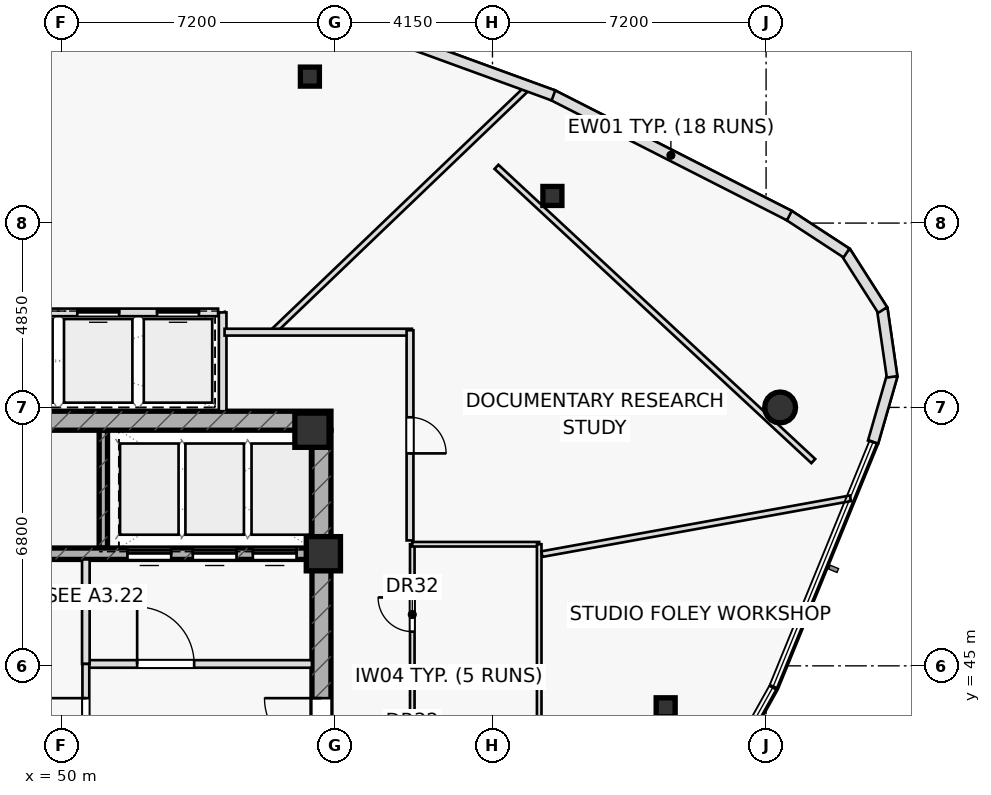
"""IFC4 building model, lengths in metres.
Left out: names, types, materials, properties, quantities, classifications, styles, units other than length and angle.
Written with IfcOpenShell. Run it as: python <this file> out.ifc"""

import sys

from ifc_helpers import new_model, si_unit, direction, frame, frame_2d, origin, origin_2d, place, context, subcontext, project, spatial, rectangle, hollow_rectangle, hollow_circle, extrude, element, fill, save


model = new_model("IFC4")
c1 = context("Model", 3, precision=1e-05, world=origin(), true_north=direction((0.0, 1.0)))
c2 = subcontext(c1, "Body", "Model", "MODEL_VIEW")
j1 = project(units=[si_unit("LENGTHUNIT", "METRE"), si_unit("PLANEANGLEUNIT", "RADIAN")], contexts=[c1])
p1 = place(None, origin())
s1 = spatial("IfcSite", under=j1, at=p1, CompositionType="ELEMENT")
p2 = place(p1, origin())
s2 = spatial("IfcBuilding", under=s1, at=p2, CompositionType="ELEMENT")
p3 = place(p2, frame((0.0, 0.0, 253.75)))
s3 = spatial("IfcBuildingStorey", under=s2, at=p3, CompositionType="ELEMENT", Elevation=253.75)
p4 = place(p3, frame((51.11, 48.1, 0.0), z_axis=(0.0, 0.0, 1.0), x_axis=(0.0, 1.0, 0.0)))
e1 = element("IfcWall", 1, at=p4, inside=s3, PredefinedType="SHEAR", context=c2, shape_type="SweptSolid", body=[
    extrude(rectangle(XDim=3.1, YDim=0.22, at=frame_2d((1.55, 0.0))), origin(), (0.0, 0.0, 1.0), 3.65),
])
p5 = place(p3, frame((42.9, 51.45, 0.0), z_axis=(0.0, 0.0, 1.0), x_axis=(1.0, 0.0, 0.0)))
e2 = element("IfcWall", 2, at=p5, inside=s3, PredefinedType="SHEAR", context=c2, shape_type="SweptSolid", body=[
    extrude(rectangle(XDim=14.2, YDim=0.5, at=frame_2d((7.1, 0.0))), origin(), (0.0, 0.0, 1.0), 3.65),
])
p6 = place(p5, frame((0.78, 0.0, 0.0)))
e3 = element("IfcOpeningElement", 3, at=p6, cuts=e2, PredefinedType="OPENING", context=c2, shape_type="SweptSolid", body=[
    extrude(rectangle(XDim=1.05, YDim=2.2, at=frame_2d((0.525, 1.1))), frame((0.0, 0.26, 0.0), z_axis=(0.0, -1.0, 0.0), x_axis=(1.0, 0.0, 0.0)), (0.0, 0.0, 1.0), 0.52),
])
p7 = place(p3, frame((56.85, 38.8, 0.0), z_axis=(0.0, 0.0, 1.0), x_axis=(0.0, 1.0, 0.0)))
e4 = element("IfcWall", 4, at=p7, inside=s3, PredefinedType="SHEAR", context=c2, shape_type="SweptSolid", body=[
    extrude(rectangle(XDim=12.4, YDim=0.5, at=frame_2d((6.2, 0.0))), origin(), (0.0, 0.0, 1.0), 3.65),
])
p8 = place(p7, frame((3.85, 0.0, 0.0)))
e5 = element("IfcOpeningElement", 5, at=p8, cuts=e4, PredefinedType="OPENING", context=c2, shape_type="SweptSolid", body=[
    extrude(rectangle(XDim=1.5, YDim=2.2, at=frame_2d((0.75, 1.1))), frame((0.0, 0.26, 0.0), z_axis=(0.0, -1.0, 0.0), x_axis=(1.0, 0.0, 0.0)), (0.0, 0.0, 1.0), 0.52),
])
p9 = place(p3, frame((43.4, 47.95, 0.0), z_axis=(0.0, 0.0, 1.0), x_axis=(1.0, 0.0, 0.0)))
e6 = element("IfcWall", 6, at=p9, inside=s3, PredefinedType="SHEAR", context=c2, shape_type="SweptSolid", body=[
    extrude(rectangle(XDim=13.2, YDim=0.3, at=frame_2d((6.6, 0.0))), origin(), (0.0, 0.0, 1.0), 3.65),
])
p10 = place(p9, frame((8.345, 0.0, 0.0)))
e7 = element("IfcOpeningElement", 7, at=p10, cuts=e6, PredefinedType="OPENING", context=c2, shape_type="SweptSolid", body=[
    extrude(rectangle(XDim=1.15, YDim=2.2, at=frame_2d((0.575, 1.1))), frame((0.0, 0.16, 0.0), z_axis=(0.0, -1.0, 0.0), x_axis=(1.0, 0.0, 0.0)), (0.0, 0.0, 1.0), 0.32),
])
p11 = place(p9, frame((10.065, 0.0, 0.0)))
e8 = element("IfcOpeningElement", 8, at=p11, cuts=e6, PredefinedType="OPENING", context=c2, shape_type="SweptSolid", body=[
    extrude(rectangle(XDim=1.15, YDim=2.2, at=frame_2d((0.575, 1.1))), frame((0.0, 0.16, 0.0), z_axis=(0.0, -1.0, 0.0), x_axis=(1.0, 0.0, 0.0)), (0.0, 0.0, 1.0), 0.32),
])
p12 = place(p9, frame((11.645, 0.0, 0.0)))
e9 = element("IfcOpeningElement", 9, at=p12, cuts=e6, PredefinedType="OPENING", context=c2, shape_type="SweptSolid", body=[
    extrude(rectangle(XDim=1.15, YDim=2.2, at=frame_2d((0.575, 1.1))), frame((0.0, 0.16, 0.0), z_axis=(0.0, -1.0, 0.0), x_axis=(1.0, 0.0, 0.0)), (0.0, 0.0, 1.0), 0.32),
])
for number, where, z_axis, x_axis in (
    (10, (56.9, 47.95, 0.0), (0.0, 0.0, 1.0), (1.0, 0.0, 0.0)),
    (11, (56.6, 51.2, 0.0), (0.0, 0.0, 1.0), (1.0, 0.0, 0.0)),
):
    element("IfcColumn", number, at=place(p3, frame(where, z_axis=z_axis, x_axis=x_axis)), inside=s3, PredefinedType="COLUMN", context=c2, shape_type="SweptSolid", body=[
        extrude(rectangle(XDim=0.9, YDim=0.9, at=origin_2d()), origin(), (0.0, 0.0, 1.0), 3.65),
    ])
p13 = place(p3, frame((65.907, 43.909, 0.0), z_axis=(0.0, 0.0, 1.0), x_axis=(1.0, 0.0, 0.0)))
e12 = element("IfcColumn", 12, at=p13, inside=s3, PredefinedType="COLUMN", context=c2, shape_type="SweptSolid", body=[
    extrude(hollow_rectangle(XDim=0.5, YDim=0.5, WallThickness=0.03, at=origin_2d()), origin(), (0.0, 0.0, 1.0), 3.65),
])
p14 = place(p3, frame((68.92, 51.799, 0.0), z_axis=(0.0, 0.0, 1.0), x_axis=(1.0, 0.0, 0.0)))
e13 = element("IfcColumn", 13, at=p14, inside=s3, PredefinedType="COLUMN", context=c2, shape_type="SweptSolid", body=[
    extrude(hollow_circle(Radius=0.406, WallThickness=0.036, at=origin_2d()), origin(), (0.0, 0.0, 1.0), 3.65),
])
for number, where, z_axis, x_axis in (
    (14, (62.927, 57.364, 0.0), (0.0, 0.0, 1.0), (1.0, 0.0, 0.0)),
    (15, (56.546, 60.504, 0.0), (0.0, 0.0, 1.0), (1.0, 0.0, 0.0)),
):
    element("IfcColumn", number, at=place(p3, frame(where, z_axis=z_axis, x_axis=x_axis)), inside=s3, PredefinedType="COLUMN", context=c2, shape_type="SweptSolid", body=[
        extrude(hollow_rectangle(XDim=0.5, YDim=0.5, WallThickness=0.03, at=origin_2d()), origin(), (0.0, 0.0, 1.0), 3.65),
    ])
p15 = place(p3, frame((54.25, 51.7, 0.0), z_axis=(0.0, 0.0, 1.0), x_axis=(0.0, 1.0, 0.0)))
e16 = element("IfcWall", 16, at=p15, inside=s3, PredefinedType="PARTITIONING", context=c2, shape_type="SweptSolid", body=[
    extrude(rectangle(XDim=2.6, YDim=0.2, at=frame_2d((1.3, 0.0))), origin(), (0.0, 0.0, 1.0), 3.65),
])
p16 = place(p3, frame((50.65, 45.05, 0.0), z_axis=(0.0, 0.0, 1.0), x_axis=(1.0, 0.0, 0.0)))
e17 = element("IfcWall", 17, at=p16, inside=s3, PredefinedType="PARTITIONING", context=c2, shape_type="SweptSolid", body=[
    extrude(rectangle(XDim=5.95, YDim=0.2, at=frame_2d((2.975, 0.0))), origin(), (0.0, 0.0, 1.0), 3.65),
])
p17 = place(p16, frame((1.35, 0.0, 0.0)))
e18 = element("IfcOpeningElement", 18, at=p17, cuts=e17, PredefinedType="OPENING", context=c2, shape_type="SweptSolid", body=[
    extrude(rectangle(XDim=1.5, YDim=2.2, at=frame_2d((0.75, 1.1))), frame((0.0, 0.11, 0.0), z_axis=(0.0, -1.0, 0.0), x_axis=(1.0, 0.0, 0.0)), (0.0, 0.0, 1.0), 0.22),
])
p18 = place(p3, frame((50.65, 45.05, 0.0), z_axis=(0.0, 0.0, 1.0), x_axis=(0.0, 1.0, 0.0)))
e19 = element("IfcWall", 19, at=p18, inside=s3, PredefinedType="PARTITIONING", context=c2, shape_type="SweptSolid", body=[
    extrude(rectangle(XDim=2.75, YDim=0.2, at=frame_2d((1.375, 0.0))), origin(), (0.0, 0.0, 1.0), 3.65),
])
p19 = place(p3, frame((50.65, 42.2, 0.0), z_axis=(0.0, 0.0, 1.0), x_axis=(0.0, 1.0, 0.0)))
e20 = element("IfcWall", 20, at=p19, inside=s3, PredefinedType="PARTITIONING", context=c2, shape_type="SweptSolid", body=[
    extrude(rectangle(XDim=2.85, YDim=0.18, at=frame_2d((1.425, 0.0))), origin(), (0.0, 0.0, 1.0), 3.65),
])
p20 = place(p19, frame((0.45, 0.0, 0.0)))
e21 = element("IfcOpeningElement", 21, at=p20, cuts=e20, PredefinedType="OPENING", context=c2, shape_type="SweptSolid", body=[
    extrude(rectangle(XDim=1.5, YDim=2.2, at=frame_2d((0.75, 1.1))), frame((0.0, 0.1, 0.0), z_axis=(0.0, -1.0, 0.0), x_axis=(1.0, 0.0, 0.0)), (0.0, 0.0, 1.0), 0.2),
])
p21 = place(p3, frame((69.792, 50.388, 0.0), z_axis=(0.0, 0.0, 1.0), x_axis=(-0.732769799181, 0.680476613418, 0.0)))
e22 = element("IfcWall", 22, at=p21, inside=s3, PredefinedType="PARTITIONING", context=c2, shape_type="SweptSolid", body=[
    extrude(rectangle(XDim=11.378, YDim=0.15, at=frame_2d((5.689, 0.0))), origin(), (0.0, 0.0, 1.0), 3.075),
])
p22 = place(p3, frame((59.24, 41.2, 0.0), z_axis=(0.0, 0.0, 1.0), x_axis=(0.0, 1.0, 0.0)))
e23 = element("IfcWall", 23, at=p22, inside=s3, PredefinedType="PARTITIONING", context=c2, shape_type="SweptSolid", body=[
    extrude(rectangle(XDim=7.0, YDim=0.12, at=frame_2d((3.5, 0.0))), origin(), (0.0, 0.0, 1.0), 3.65),
])
p23 = place(p22, frame((1.15, 0.0, 0.0)))
e24 = element("IfcOpeningElement", 24, at=p23, cuts=e23, PredefinedType="OPENING", context=c2, shape_type="SweptSolid", body=[
    extrude(rectangle(XDim=0.9, YDim=2.05, at=frame_2d((0.45, 1.025))), frame((0.0, 0.07, 0.0), z_axis=(0.0, -1.0, 0.0), x_axis=(1.0, 0.0, 0.0)), (0.0, 0.0, 1.0), 0.14),
])
p24 = place(p22, frame((4.7, 0.0, 0.0)))
e25 = element("IfcOpeningElement", 25, at=p24, cuts=e23, PredefinedType="OPENING", context=c2, shape_type="SweptSolid", body=[
    extrude(rectangle(XDim=0.9, YDim=2.05, at=frame_2d((0.45, 1.025))), frame((0.0, 0.07, 0.0), z_axis=(0.0, -1.0, 0.0), x_axis=(1.0, 0.0, 0.0)), (0.0, 0.0, 1.0), 0.14),
])
for number, where, z_axis, x_axis in (
    (26, (59.24, 44.65, 0.0), (0.0, 0.0, 1.0), (1.0, 0.0, 0.0)),
    (27, (59.24, 48.2, 0.0), (0.0, 0.0, 1.0), (1.0, 0.0, 0.0)),
):
    element("IfcWall", number, at=place(p3, frame(where, z_axis=z_axis, x_axis=x_axis)), inside=s3, PredefinedType="PARTITIONING", context=c2, shape_type="SweptSolid", body=[
        extrude(rectangle(XDim=3.34, YDim=0.12, at=frame_2d((1.67, 0.0))), origin(), (0.0, 0.0, 1.0), 3.65),
    ])
p25 = place(p3, frame((62.58, 41.2, 0.0), z_axis=(0.0, 0.0, 1.0), x_axis=(0.0, 1.0, 0.0)))
e28 = element("IfcWall", 28, at=p25, inside=s3, PredefinedType="PARTITIONING", context=c2, shape_type="SweptSolid", body=[
    extrude(rectangle(XDim=7.0, YDim=0.12, at=frame_2d((3.5, 0.0))), origin(), (0.0, 0.0, 1.0), 3.355),
])
p26 = place(p3, frame((62.65, 47.94, 0.0), z_axis=(0.0, 0.0, 1.0), x_axis=(0.984026667132, 0.178021117775, 0.0)))
e29 = element("IfcWall", 29, at=p26, inside=s3, PredefinedType="PARTITIONING", context=c2, shape_type="SweptSolid", body=[
    extrude(rectangle(XDim=8.253, YDim=0.15, at=frame_2d((4.126, 0.0))), origin(), (0.0, 0.0, 1.0), 3.175),
])
p27 = place(p3, frame((55.563, 53.78, 0.0), z_axis=(0.0, 0.0, 1.0), x_axis=(0.722044702651, 0.691846404467, 0.0)))
e30 = element("IfcWall", 30, at=p27, inside=s3, PredefinedType="PARTITIONING", context=c2, shape_type="SweptSolid", body=[
    extrude(rectangle(XDim=9.354, YDim=0.15, at=frame_2d((4.677, 0.0))), origin(), (0.0, 0.0, 1.0), 3.075),
])
p28 = place(p3, frame((54.3, 53.78, 0.0), z_axis=(0.0, 0.0, 1.0), x_axis=(1.0, 0.0, 0.0)))
e31 = element("IfcWall", 31, at=p28, inside=s3, PredefinedType="PARTITIONING", context=c2, shape_type="SweptSolid", body=[
    extrude(rectangle(XDim=4.93, YDim=0.18, at=frame_2d((2.465, 0.0))), origin(), (0.0, 0.0, 1.0), 3.65),
])
p29 = place(p3, frame((59.18, 53.83, 0.0), z_axis=(0.0, 0.0, 1.0), x_axis=(0.0, -1.0, 0.0)))
e32 = element("IfcWall", 32, at=p29, inside=s3, PredefinedType="PARTITIONING", context=c2, shape_type="SweptSolid", body=[
    extrude(rectangle(XDim=5.53, YDim=0.18, at=frame_2d((2.765, 0.0))), origin(), (0.0, 0.0, 1.0), 3.65),
])
p30 = place(p29, frame((2.29, 0.0, 0.0)))
e33 = element("IfcOpeningElement", 33, at=p30, cuts=e32, PredefinedType="OPENING", context=c2, shape_type="SweptSolid", body=[
    extrude(rectangle(XDim=0.95, YDim=2.05, at=frame_2d((0.475, 1.025))), frame((0.0, 0.1, 0.0), z_axis=(0.0, -1.0, 0.0), x_axis=(1.0, 0.0, 0.0)), (0.0, 0.0, 1.0), 0.2),
])
p31 = place(p3, frame((71.365, 50.888, 0.0), z_axis=(0.0, 0.0, 1.0), x_axis=(0.276549565127, 0.960999655582, 0.0)))
e34 = element("IfcWall", 34, at=p31, inside=s3, PredefinedType="STANDARD", context=c2, shape_type="SweptSolid", body=[
    extrude(rectangle(XDim=1.816, YDim=0.28, at=frame_2d((0.908, 0.0))), origin(), (0.0, 0.0, 1.0), 3.65),
])
p32 = place(p3, frame((71.865, 52.604, 0.0), z_axis=(0.0, 0.0, 1.0), x_axis=(-0.143542374069, 0.989644171835, 0.0)))
e35 = element("IfcWall", 35, at=p32, inside=s3, PredefinedType="STANDARD", context=c2, shape_type="SweptSolid", body=[
    extrude(rectangle(XDim=1.805, YDim=0.28, at=frame_2d((0.902, 0.0))), origin(), (0.0, 0.0, 1.0), 3.65),
])
p33 = place(p3, frame((71.617, 54.362, 0.0), z_axis=(0.0, 0.0, 1.0), x_axis=(-0.538074313657, 0.842897403592, 0.0)))
e36 = element("IfcWall", 36, at=p33, inside=s3, PredefinedType="STANDARD", context=c2, shape_type="SweptSolid", body=[
    extrude(rectangle(XDim=1.804, YDim=0.28, at=frame_2d((0.902, 0.0))), origin(), (0.0, 0.0, 1.0), 3.65),
])
p34 = place(p3, frame((70.667, 55.863, 0.0), z_axis=(0.0, 0.0, 1.0), x_axis=(-0.837275498284, 0.546781254226, 0.0)))
e37 = element("IfcWall", 37, at=p34, inside=s3, PredefinedType="STANDARD", context=c2, shape_type="SweptSolid", body=[
    extrude(rectangle(XDim=1.827, YDim=0.28, at=frame_2d((0.914, 0.0))), origin(), (0.0, 0.0, 1.0), 3.65),
])
p35 = place(p3, frame((69.163, 56.847, 0.0), z_axis=(0.0, 0.0, 1.0), x_axis=(-0.891208253526, 0.453594365979, 0.0)))
e38 = element("IfcWall", 38, at=p35, inside=s3, PredefinedType="STANDARD", context=c2, shape_type="SweptSolid", body=[
    extrude(rectangle(XDim=6.997, YDim=0.28, at=frame_2d((3.499, 0.0))), origin(), (0.0, 0.0, 1.0), 3.65),
])
p36 = place(p3, frame((62.954, 60.009, 0.0), z_axis=(0.0, 0.0, 1.0), x_axis=(-0.939538048842, 0.342444528032, 0.0)))
e39 = element("IfcWall", 39, at=p36, inside=s3, PredefinedType="STANDARD", context=c2, shape_type="SweptSolid", body=[
    extrude(rectangle(XDim=6.985, YDim=0.28, at=frame_2d((3.493, 0.0))), origin(), (0.0, 0.0, 1.0), 3.65),
])
p37 = place(p3, frame((45.82, 54.3, 0.0), z_axis=(0.0, 0.0, 1.0), x_axis=(1.0, 0.0, 0.0)))
e40 = element("IfcWall", 40, at=p37, inside=s3, PredefinedType="PARTITIONING", context=c2, shape_type="SweptSolid", body=[
    extrude(rectangle(XDim=8.31, YDim=0.2, at=frame_2d((4.155, 0.0))), origin(), (0.0, 0.0, 1.0), 3.65),
])
p38 = place(p37, frame((0.405, 0.0, 0.0)))
e41 = element("IfcOpeningElement", 41, at=p38, cuts=e40, PredefinedType="OPENING", context=c2, shape_type="SweptSolid", body=[
    extrude(rectangle(XDim=1.1, YDim=2.15, at=frame_2d((0.55, 1.075))), frame((0.0, 0.11, 0.0), z_axis=(0.0, -1.0, 0.0), x_axis=(1.0, 0.0, 0.0)), (0.0, 0.0, 1.0), 0.22),
])
p39 = place(p37, frame((2.505, 0.0, 0.0)))
e42 = element("IfcOpeningElement", 42, at=p39, cuts=e40, PredefinedType="OPENING", context=c2, shape_type="SweptSolid", body=[
    extrude(rectangle(XDim=1.1, YDim=2.15, at=frame_2d((0.55, 1.075))), frame((0.0, 0.11, 0.0), z_axis=(0.0, -1.0, 0.0), x_axis=(1.0, 0.0, 0.0)), (0.0, 0.0, 1.0), 0.22),
])
p40 = place(p37, frame((4.605, 0.0, 0.0)))
e43 = element("IfcOpeningElement", 43, at=p40, cuts=e40, PredefinedType="OPENING", context=c2, shape_type="SweptSolid", body=[
    extrude(rectangle(XDim=1.1, YDim=2.15, at=frame_2d((0.55, 1.075))), frame((0.0, 0.11, 0.0), z_axis=(0.0, -1.0, 0.0), x_axis=(1.0, 0.0, 0.0)), (0.0, 0.0, 1.0), 0.22),
])
p41 = place(p37, frame((6.705, 0.0, 0.0)))
e44 = element("IfcOpeningElement", 44, at=p41, cuts=e40, PredefinedType="OPENING", context=c2, shape_type="SweptSolid", body=[
    extrude(rectangle(XDim=1.1, YDim=2.15, at=frame_2d((0.55, 1.075))), frame((0.0, 0.11, 0.0), z_axis=(0.0, -1.0, 0.0), x_axis=(1.0, 0.0, 0.0)), (0.0, 0.0, 1.0), 0.22),
])
p42 = place(p8, origin())
e45 = element("IfcDoor", 45, at=p42, inside=s3, OperationType="SINGLE_SWING_RIGHT", PredefinedType="DOOR", context=c2, shape_type="SweptSolid", body=[
    extrude(rectangle(XDim=1.5, YDim=2.2, at=frame_2d((0.75, 1.1))), frame((0.0, 0.025, 0.0), z_axis=(0.0, -1.0, 0.0), x_axis=(1.0, 0.0, 0.0)), (0.0, 0.0, 1.0), 0.05),
])
fill(e5, e45)
p43 = place(p17, origin())
e46 = element("IfcDoor", 46, at=p43, inside=s3, OperationType="SINGLE_SWING_LEFT", PredefinedType="DOOR", context=c2, shape_type="SweptSolid", body=[
    extrude(rectangle(XDim=1.5, YDim=2.2, at=frame_2d((0.75, 1.1))), frame((0.0, 0.025, 0.0), z_axis=(0.0, -1.0, 0.0), x_axis=(1.0, 0.0, 0.0)), (0.0, 0.0, 1.0), 0.05),
])
fill(e18, e46)
p44 = place(p20, origin())
e47 = element("IfcDoor", 47, at=p44, inside=s3, OperationType="SINGLE_SWING_RIGHT", PredefinedType="DOOR", context=c2, shape_type="SweptSolid", body=[
    extrude(rectangle(XDim=1.5, YDim=2.2, at=frame_2d((0.75, 1.1))), frame((0.0, 0.025, 0.0), z_axis=(0.0, -1.0, 0.0), x_axis=(1.0, 0.0, 0.0)), (0.0, 0.0, 1.0), 0.05),
])
fill(e21, e47)
p45 = place(p24, origin())
e48 = element("IfcDoor", 48, at=p45, inside=s3, OperationType="SINGLE_SWING_RIGHT", PredefinedType="DOOR", context=c2, shape_type="SweptSolid", body=[
    extrude(rectangle(XDim=0.9, YDim=2.05, at=frame_2d((0.45, 1.025))), frame((0.0, 0.025, 0.0), z_axis=(0.0, -1.0, 0.0), x_axis=(1.0, 0.0, 0.0)), (0.0, 0.0, 1.0), 0.05),
])
fill(e25, e48)
p46 = place(p30, origin())
e49 = element("IfcDoor", 49, at=p46, inside=s3, OperationType="SINGLE_SWING_RIGHT", PredefinedType="DOOR", context=c2, shape_type="SweptSolid", body=[
    extrude(rectangle(XDim=0.95, YDim=2.05, at=frame_2d((0.475, 1.025))), frame((0.0, 0.025, 0.0), z_axis=(0.0, -1.0, 0.0), x_axis=(1.0, 0.0, 0.0)), (0.0, 0.0, 1.0), 0.05),
])
fill(e33, e49)
p47 = place(p10, origin())
e50 = element("IfcDoor", 50, at=p47, inside=s3, OperationType="SLIDING_TO_LEFT", PredefinedType="DOOR", context=c2, shape_type="SweptSolid", body=[
    extrude(rectangle(XDim=1.15, YDim=2.2, at=frame_2d((0.575, 1.1))), frame((0.0, 0.025, 0.0), z_axis=(0.0, -1.0, 0.0), x_axis=(1.0, 0.0, 0.0)), (0.0, 0.0, 1.0), 0.05),
])
fill(e7, e50)
p48 = place(p11, origin())
e51 = element("IfcDoor", 51, at=p48, inside=s3, OperationType="SLIDING_TO_LEFT", PredefinedType="DOOR", context=c2, shape_type="SweptSolid", body=[
    extrude(rectangle(XDim=1.15, YDim=2.2, at=frame_2d((0.575, 1.1))), frame((0.0, 0.025, 0.0), z_axis=(0.0, -1.0, 0.0), x_axis=(1.0, 0.0, 0.0)), (0.0, 0.0, 1.0), 0.05),
])
fill(e8, e51)
p49 = place(p12, origin())
e52 = element("IfcDoor", 52, at=p49, inside=s3, OperationType="SLIDING_TO_LEFT", PredefinedType="DOOR", context=c2, shape_type="SweptSolid", body=[
    extrude(rectangle(XDim=1.15, YDim=2.2, at=frame_2d((0.575, 1.1))), frame((0.0, 0.025, 0.0), z_axis=(0.0, -1.0, 0.0), x_axis=(1.0, 0.0, 0.0)), (0.0, 0.0, 1.0), 0.05),
])
fill(e9, e52)
p50 = place(p40, origin())
e53 = element("IfcDoor", 53, at=p50, inside=s3, OperationType="SLIDING_TO_LEFT", PredefinedType="DOOR", context=c2, shape_type="SweptSolid", body=[
    extrude(rectangle(XDim=1.1, YDim=2.15, at=frame_2d((0.55, 1.075))), frame((0.0, 0.025, 0.0), z_axis=(0.0, -1.0, 0.0), x_axis=(1.0, 0.0, 0.0)), (0.0, 0.0, 1.0), 0.05),
])
fill(e43, e53)
p51 = place(p41, origin())
e54 = element("IfcDoor", 54, at=p51, inside=s3, OperationType="SLIDING_TO_RIGHT", PredefinedType="DOOR", context=c2, shape_type="SweptSolid", body=[
    extrude(rectangle(XDim=1.1, YDim=2.15, at=frame_2d((0.55, 1.075))), frame((0.0, 0.025, 0.0), z_axis=(0.0, -1.0, 0.0), x_axis=(1.0, 0.0, 0.0)), (0.0, 0.0, 1.0), 0.05),
])
fill(e44, e54)
save(model, sys.argv[1])
